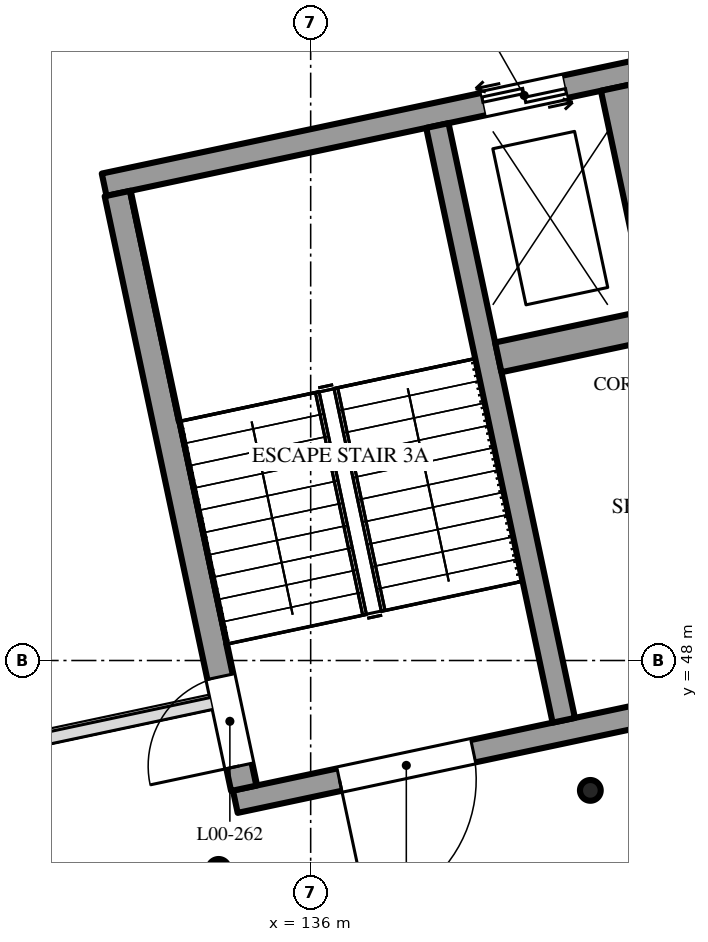
"""IFC4 building model, lengths in metres.
Left out: names, types, materials, properties, quantities, classifications, styles, units other than length and angle.
Written with IfcOpenShell. Run it as: python <this file> out.ifc"""

import sys

from ifc_helpers import new_model, si_unit, direction, frame, frame_2d, origin, origin_2d, place, context, subcontext, project, spatial, rectangle, hollow_circle, extrude, element, fill, save


model = new_model("IFC4")
c1 = context("Model", 3, precision=1e-05, world=origin(), true_north=direction((0.0, 1.0)))
c2 = subcontext(c1, "Body", "Model", "MODEL_VIEW")
j1 = project(units=[si_unit("LENGTHUNIT", "METRE"), si_unit("PLANEANGLEUNIT", "RADIAN")], contexts=[c1])
p1 = place(None, origin())
s1 = spatial("IfcSite", under=j1, at=p1, CompositionType="ELEMENT")
p2 = place(p1, origin())
s2 = spatial("IfcBuilding", under=s1, at=p2, CompositionType="ELEMENT")
p3 = place(p2, origin())
s3 = spatial("IfcBuildingStorey", under=s2, at=p3, CompositionType="ELEMENT", Elevation=0.0)
p4 = place(p3, frame((135.009, 46.142, -1.4), z_axis=(0.0, 0.0, 1.0), x_axis=(0.978147662755, 0.20791139903, 0.0)))
e1 = element("IfcWall", 1, at=p4, inside=s3, PredefinedType="SHEAR", context=c2, shape_type="SweptSolid", body=[
    extrude(rectangle(XDim=13.7, YDim=0.3, at=frame_2d((6.85, 0.0))), origin(), (0.0, 0.0, 1.0), 8.6),
])
p5 = place(p4, frame((1.4, 0.0, 1.4)))
e2 = element("IfcOpeningElement", 2, at=p5, cuts=e1, PredefinedType="OPENING", context=c2, shape_type="SweptSolid", body=[
    extrude(rectangle(XDim=1.8, YDim=2.1, at=frame_2d((0.9, 1.05))), frame((0.0, 0.16, 0.0), z_axis=(0.0, -1.0, 0.0), x_axis=(1.0, 0.0, 0.0)), (0.0, 0.0, 1.0), 0.32),
])
p6 = place(p4, frame((10.5, 0.0, 1.4)))
e3 = element("IfcOpeningElement", 3, at=p6, cuts=e1, PredefinedType="OPENING", context=c2, shape_type="SweptSolid", body=[
    extrude(rectangle(XDim=1.8, YDim=2.1, at=frame_2d((0.9, 1.05))), frame((0.0, 0.16, 0.0), z_axis=(0.0, -1.0, 0.0), x_axis=(1.0, 0.0, 0.0)), (0.0, 0.0, 1.0), 0.32),
])
p7 = place(p4, frame((6.35, 0.0, 1.4)))
e4 = element("IfcOpeningElement", 4, at=p7, cuts=e1, PredefinedType="OPENING", context=c2, shape_type="SweptSolid", body=[
    extrude(rectangle(XDim=1.0, YDim=2.1, at=frame_2d((0.5, 1.05))), frame((0.0, 0.16, 0.0), z_axis=(0.0, -1.0, 0.0), x_axis=(1.0, 0.0, 0.0)), (0.0, 0.0, 1.0), 0.32),
])
p8 = place(p3, frame((133.283, 54.26, -1.4), z_axis=(0.0, 0.0, 1.0), x_axis=(0.978147662755, 0.20791139903, 0.0)))
e5 = element("IfcWall", 5, at=p8, inside=s3, PredefinedType="SHEAR", context=c2, shape_type="SweptSolid", body=[
    extrude(rectangle(XDim=13.7, YDim=0.3, at=frame_2d((6.85, 0.0))), origin(), (0.0, 0.0, 1.0), 8.6),
])
p9 = place(p8, frame((5.1, 0.0, 1.4)))
e6 = element("IfcOpeningElement", 6, at=p9, cuts=e5, PredefinedType="OPENING", context=c2, shape_type="SweptSolid", body=[
    extrude(rectangle(XDim=1.1, YDim=2.1, at=frame_2d((0.55, 1.05))), frame((0.0, 0.16, 0.0), z_axis=(0.0, -1.0, 0.0), x_axis=(1.0, 0.0, 0.0)), (0.0, 0.0, 1.0), 0.32),
])
p10 = place(p8, frame((7.5, 0.0, 1.4)))
e7 = element("IfcOpeningElement", 7, at=p10, cuts=e5, PredefinedType="OPENING", context=c2, shape_type="SweptSolid", body=[
    extrude(rectangle(XDim=1.1, YDim=2.1, at=frame_2d((0.55, 1.05))), frame((0.0, 0.16, 0.0), z_axis=(0.0, -1.0, 0.0), x_axis=(1.0, 0.0, 0.0)), (0.0, 0.0, 1.0), 0.32),
])
p11 = place(p3, frame((135.124, 46.32, -1.4), z_axis=(0.0, 0.0, 1.0), x_axis=(-0.207886494942, 0.978152955943, 0.0)))
e8 = element("IfcWall", 8, at=p11, inside=s3, PredefinedType="SOLIDWALL", context=c2, shape_type="SweptSolid", body=[
    extrude(rectangle(XDim=8.0, YDim=0.35, at=frame_2d((4.0, 0.0))), origin(), (0.0, 0.0, 1.0), 8.6),
])
p12 = place(p11, frame((0.3, 0.0, 1.4)))
e9 = element("IfcOpeningElement", 9, at=p12, cuts=e8, PredefinedType="OPENING", context=c2, shape_type="SweptSolid", body=[
    extrude(rectangle(XDim=1.2, YDim=2.1, at=frame_2d((0.6, 1.05))), frame((0.0, 0.185, 0.0), z_axis=(0.0, -1.0, 0.0), x_axis=(1.0, 0.0, 0.0)), (0.0, 0.0, 1.0), 0.37),
])
p13 = place(p3, frame((139.33, 47.214, -1.4), z_axis=(0.0, 0.0, 1.0), x_axis=(-0.207915693476, 0.978146749934, 0.0)))
e10 = element("IfcWall", 10, at=p13, inside=s3, PredefinedType="SHEAR", context=c2, shape_type="SweptSolid", body=[
    extrude(rectangle(XDim=8.0, YDim=0.3, at=frame_2d((4.0, 0.0))), origin(), (0.0, 0.0, 1.0), 8.6),
])
p14 = place(p3, frame((140.638, 52.603, -1.4), z_axis=(0.0, 0.0, 1.0), x_axis=(-0.207917150959, 0.978146440129, 0.0)))
e11 = element("IfcWall", 11, at=p14, inside=s3, PredefinedType="SHEAR", context=c2, shape_type="SweptSolid", body=[
    extrude(rectangle(XDim=3.0, YDim=0.4, at=frame_2d((1.5, 0.0))), origin(), (0.0, 0.0, 1.0), 8.6),
])
p15 = place(p3, frame((138.469, 51.989, -1.4), z_axis=(0.0, 0.0, 1.0), x_axis=(0.978149611564, 0.20790223038, 0.0)))
e12 = element("IfcWall", 12, at=p15, inside=s3, PredefinedType="SHEAR", context=c2, shape_type="SweptSolid", body=[
    extrude(rectangle(XDim=4.5, YDim=0.4, at=frame_2d((2.25, 0.0))), origin(), (0.0, 0.0, 1.0), 8.6),
])
for number, where, z_axis, x_axis in (
    (13, (134.789, 45.251, -0.4), (0.0, 0.0, 1.0), (0.978, 0.208, 0.0)),
    (14, (139.68, 46.291, -0.4), (0.0, 0.0, 1.0), (0.978, 0.208, 0.0)),
):
    element("IfcColumn", number, at=place(p3, frame(where, z_axis=z_axis, x_axis=x_axis)), inside=s3, PredefinedType="COLUMN", context=c2, shape_type="SweptSolid", body=[
        extrude(hollow_circle(Radius=0.136, WallThickness=0.012, at=origin_2d()), origin(), (0.0, 0.0, 1.0), 4.389),
    ])
p16 = place(p9, origin())
e15 = element("IfcDoor", 15, at=p16, inside=s3, OperationType="DOUBLE_DOOR_SLIDING", PredefinedType="DOOR", context=c2, shape_type="SweptSolid", body=[
    extrude(rectangle(XDim=1.1, YDim=2.1, at=frame_2d((0.55, 1.05))), frame((0.0, 0.025, 0.0), z_axis=(0.0, -1.0, 0.0), x_axis=(1.0, 0.0, 0.0)), (0.0, 0.0, 1.0), 0.05),
])
fill(e6, e15)
p17 = place(p12, origin())
e16 = element("IfcDoor", 16, at=p17, inside=s3, OperationType="SINGLE_SWING_LEFT", PredefinedType="DOOR", context=c2, shape_type="SweptSolid", body=[
    extrude(rectangle(XDim=1.2, YDim=2.1, at=frame_2d((0.6, 1.05))), frame((0.0, 0.025, 0.0), z_axis=(0.0, -1.0, 0.0), x_axis=(1.0, 0.0, 0.0)), (0.0, 0.0, 1.0), 0.05),
])
fill(e9, e16)
p18 = place(p5, frame((1.8, 0.0, 0.0), z_axis=(0.0, 0.0, 1.0), x_axis=(-1.0, 0.0, 0.0)))
e17 = element("IfcDoor", 17, at=p18, inside=s3, OperationType="DOUBLE_DOOR_SINGLE_SWING", PredefinedType="DOOR", context=c2, shape_type="SweptSolid", body=[
    extrude(rectangle(XDim=1.8, YDim=2.1, at=frame_2d((0.9, 1.05))), frame((0.0, 0.025, 0.0), z_axis=(0.0, -1.0, 0.0), x_axis=(1.0, 0.0, 0.0)), (0.0, 0.0, 1.0), 0.05),
])
fill(e2, e17)
save(model, sys.argv[1])
